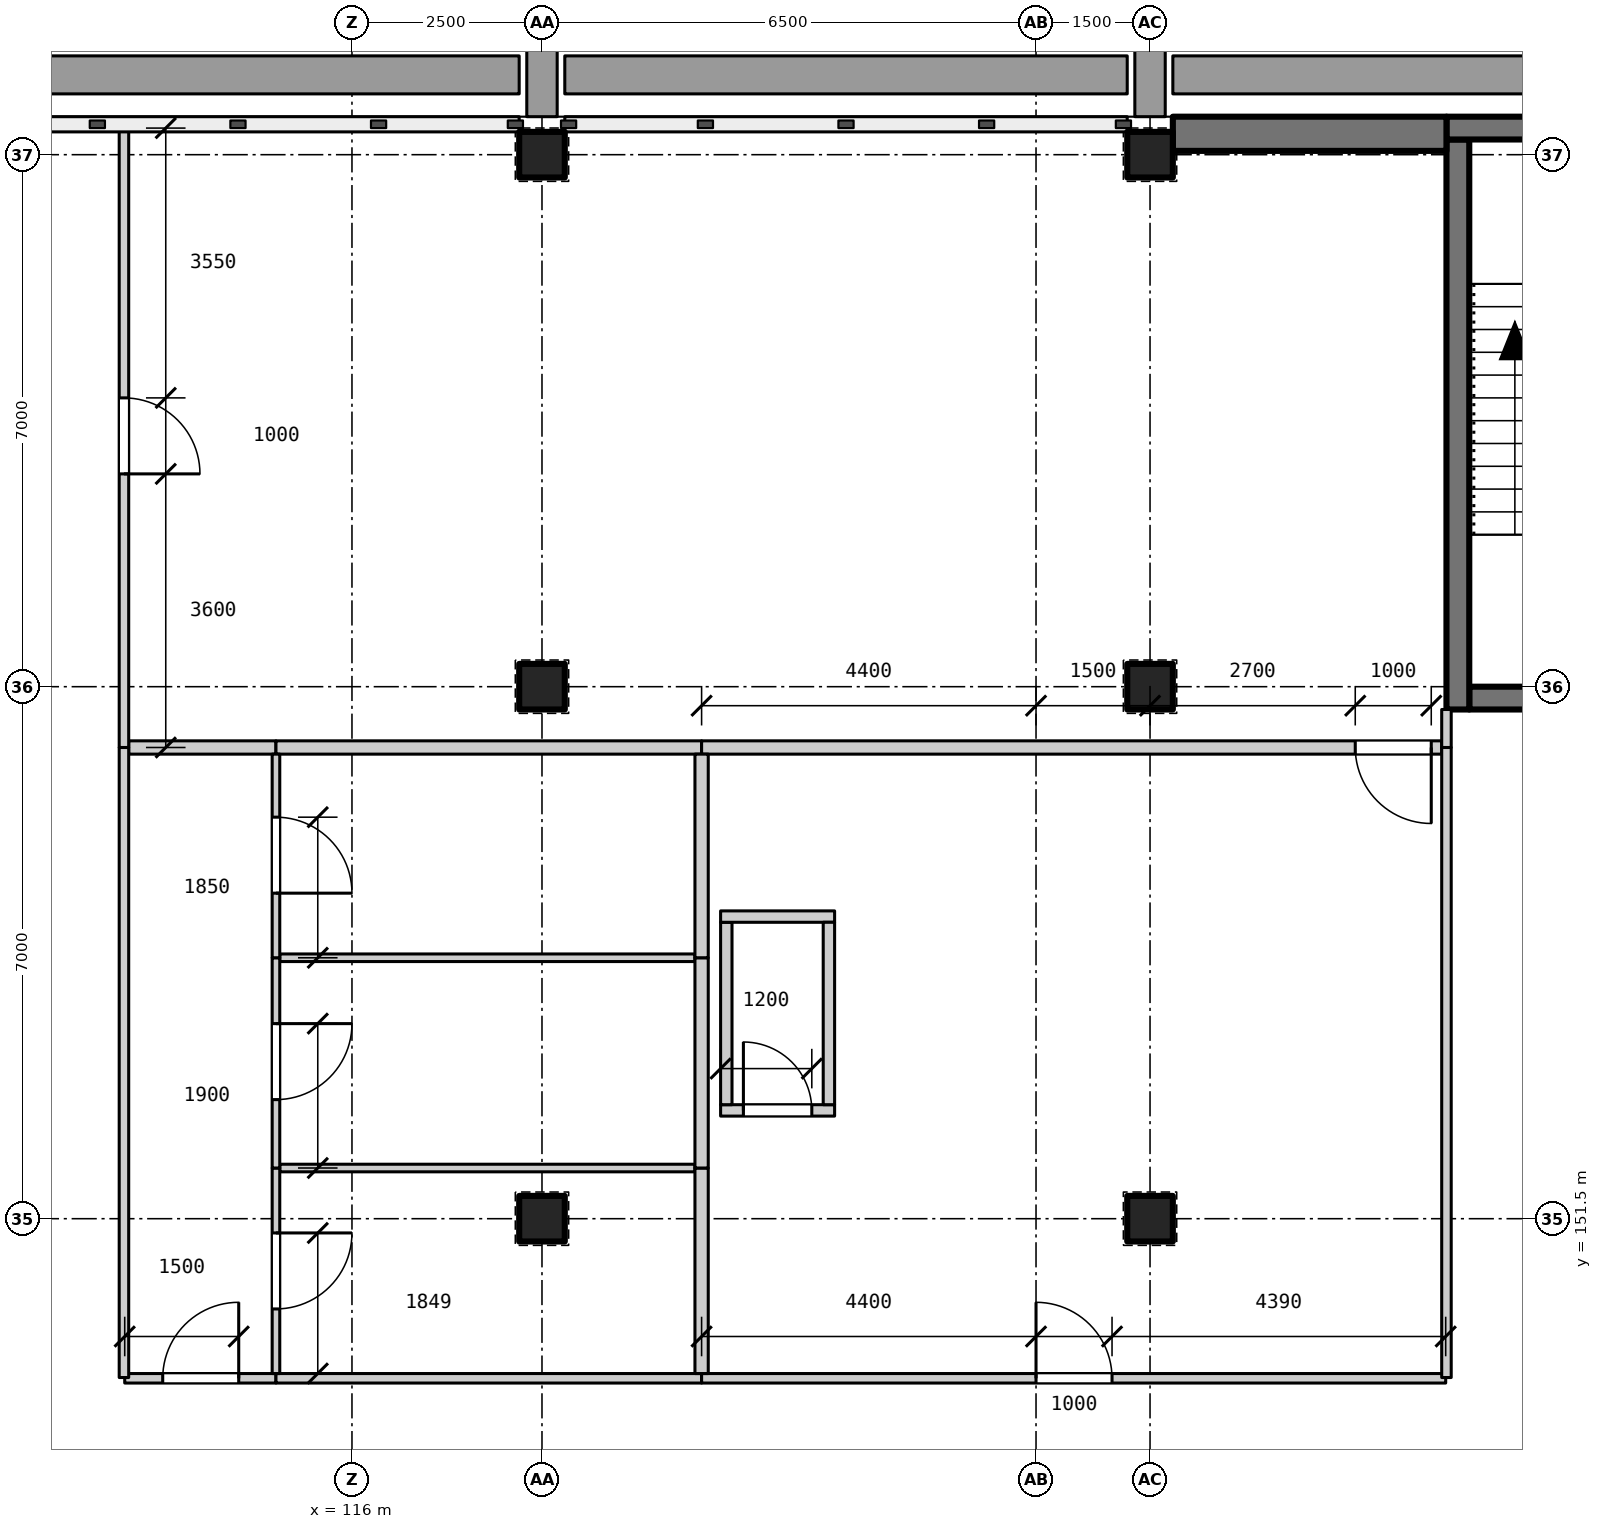
"""IFC4 building model, lengths in metres.
Left out: names, types, materials, properties, quantities, classifications, styles, units other than length and angle.
Written with IfcOpenShell. Run it as: python <this file> out.ifc"""

import sys

from ifc_helpers import new_model, si_unit, direction, frame, frame_2d, origin, origin_2d, place, context, subcontext, project, spatial, rectangle, extrude, element, fill, save


model = new_model("IFC4")
c1 = context("Model", 3, precision=1e-05, world=origin(), true_north=direction((0.0, 1.0)))
c2 = subcontext(c1, "Body", "Model", "MODEL_VIEW")
j1 = project(units=[si_unit("LENGTHUNIT", "METRE"), si_unit("PLANEANGLEUNIT", "RADIAN")], contexts=[c1])
p1 = place(None, origin())
s1 = spatial("IfcSite", under=j1, at=p1, CompositionType="ELEMENT")
p2 = place(p1, origin())
s2 = spatial("IfcBuilding", under=s1, at=p2, CompositionType="ELEMENT")
p3 = place(p2, frame((0.0, 0.0, 10.2)))
s3 = spatial("IfcBuildingStorey", under=s2, at=p3, CompositionType="ELEMENT", Elevation=10.2)
for number, where, z_axis, x_axis in (
    (1, (118.5, 151.5, 0.0), (0.0, 0.0, 1.0), (1.0, 0.0, 0.0)),
    (2, (118.5, 158.5, 0.0), (0.0, 0.0, 1.0), (1.0, 0.0, 0.0)),
    (3, (118.5, 165.5, 0.0), (0.0, 0.0, 1.0), (1.0, 0.0, 0.0)),
    (4, (126.5, 151.5, 0.0), (0.0, 0.0, 1.0), (1.0, 0.0, 0.0)),
    (5, (126.5, 158.5, 0.0), (0.0, 0.0, 1.0), (1.0, 0.0, 0.0)),
    (6, (126.5, 165.5, 0.0), (0.0, 0.0, 1.0), (1.0, 0.0, 0.0)),
):
    element("IfcColumn", number, at=place(p3, frame(where, z_axis=z_axis, x_axis=x_axis)), inside=s3, PredefinedType="COLUMN", context=c2, shape_type="SweptSolid", body=[
        extrude(rectangle(XDim=0.6, YDim=0.6, at=origin_2d()), origin(), (0.0, 0.0, 1.0), 4.2),
    ])
p4 = place(p3, frame((130.7, 158.35, 0.0), z_axis=(0.0, 0.0, 1.0), x_axis=(1.0, 0.0, 0.0)))
e7 = element("IfcWall", 7, at=p4, inside=s3, PredefinedType="SHEAR", context=c2, shape_type="SweptSolid", body=[
    extrude(rectangle(XDim=3.0, YDim=0.3, at=frame_2d((1.5, 0.0))), origin(), (0.0, 0.0, 1.0), 4.2),
])
p5 = place(p4, frame((0.95, 0.0, 0.0)))
e8 = element("IfcOpeningElement", 8, at=p5, cuts=e7, PredefinedType="OPENING", context=c2, shape_type="SweptSolid", body=[
    extrude(rectangle(XDim=1.1, YDim=2.1, at=frame_2d((0.55, 1.05))), frame((0.0, 0.16, 0.0), z_axis=(0.0, -1.0, 0.0), x_axis=(1.0, 0.0, 0.0)), (0.0, 0.0, 1.0), 0.32),
])
p6 = place(p3, frame((130.55, 158.2, 0.0), z_axis=(0.0, 0.0, 1.0), x_axis=(0.0, 1.0, 0.0)))
e9 = element("IfcWall", 9, at=p6, inside=s3, PredefinedType="SHEAR", context=c2, shape_type="SweptSolid", body=[
    extrude(rectangle(XDim=7.5, YDim=0.3, at=frame_2d((3.75, 0.0))), origin(), (0.0, 0.0, 1.0), 4.2),
])
p7 = place(p3, frame((130.4, 165.85, 0.0), z_axis=(0.0, 0.0, 1.0), x_axis=(1.0, 0.0, 0.0)))
e10 = element("IfcWall", 10, at=p7, inside=s3, PredefinedType="SOLIDWALL", context=c2, shape_type="SweptSolid", body=[
    extrude(rectangle(XDim=3.6, YDim=0.3, at=frame_2d((1.8, 0.0))), origin(), (0.0, 0.0, 1.0), 3.9),
])
p8 = place(p3, frame((126.8, 165.775, 0.0), z_axis=(0.0, 0.0, 1.0), x_axis=(1.0, 0.0, 0.0)))
e11 = element("IfcWall", 11, at=p8, inside=s3, PredefinedType="SOLIDWALL", context=c2, shape_type="SweptSolid", body=[
    extrude(rectangle(XDim=3.6, YDim=0.45, at=frame_2d((1.8, 0.0))), origin(), (0.0, 0.0, 1.0), 3.1),
])
p9 = place(p3, frame((120.85, 152.925, 0.0), z_axis=(0.0, 0.0, 1.0), x_axis=(1.0, 0.0, 0.0)))
e12 = element("IfcWall", 12, at=p9, inside=s3, PredefinedType="PARTITIONING", context=c2, shape_type="SweptSolid", body=[
    extrude(rectangle(XDim=1.5, YDim=0.15, at=frame_2d((0.75, 0.0))), origin(), (0.0, 0.0, 1.0), 3.9),
])
p10 = place(p9, frame((0.3, 0.0, 0.0)))
e13 = element("IfcOpeningElement", 13, at=p10, cuts=e12, PredefinedType="OPENING", context=c2, shape_type="SweptSolid", body=[
    extrude(rectangle(XDim=0.9, YDim=2.1, at=frame_2d((0.45, 1.05))), frame((0.0, 0.085, 0.0), z_axis=(0.0, -1.0, 0.0), x_axis=(1.0, 0.0, 0.0)), (0.0, 0.0, 1.0), 0.17),
])
p11 = place(p3, frame((120.925, 153.0, 0.0), z_axis=(0.0, 0.0, 1.0), x_axis=(0.0, 1.0, 0.0)))
e14 = element("IfcWall", 14, at=p11, inside=s3, PredefinedType="PARTITIONING", context=c2, shape_type="SweptSolid", body=[
    extrude(rectangle(XDim=2.4, YDim=0.15, at=frame_2d((1.2, 0.0))), origin(), (0.0, 0.0, 1.0), 3.9),
])
p12 = place(p3, frame((120.85, 155.475, 0.0), z_axis=(0.0, 0.0, 1.0), x_axis=(1.0, 0.0, 0.0)))
e15 = element("IfcWall", 15, at=p12, inside=s3, PredefinedType="PARTITIONING", context=c2, shape_type="SweptSolid", body=[
    extrude(rectangle(XDim=1.5, YDim=0.15, at=frame_2d((0.75, 0.0))), origin(), (0.0, 0.0, 1.0), 3.9),
])
p13 = place(p3, frame((122.275, 153.0, 0.0), z_axis=(0.0, 0.0, 1.0), x_axis=(0.0, 1.0, 0.0)))
e16 = element("IfcWall", 16, at=p13, inside=s3, PredefinedType="PARTITIONING", context=c2, shape_type="SweptSolid", body=[
    extrude(rectangle(XDim=2.4, YDim=0.15, at=frame_2d((1.2, 0.0))), origin(), (0.0, 0.0, 1.0), 3.9),
])
p14 = place(p3, frame((113.01, 149.4, 0.0), z_axis=(0.0, 0.0, 1.0), x_axis=(1.0, 0.0, 0.0)))
e17 = element("IfcWall", 17, at=p14, inside=s3, PredefinedType="PARTITIONING", context=c2, shape_type="SweptSolid", body=[
    extrude(rectangle(XDim=1.99, YDim=0.125, at=frame_2d((0.995, 0.0))), origin(), (0.0, 0.0, 1.0), 3.9),
])
p15 = place(p14, frame((0.5, 0.0, 0.0)))
e18 = element("IfcOpeningElement", 18, at=p15, cuts=e17, PredefinedType="OPENING", context=c2, shape_type="SweptSolid", body=[
    extrude(rectangle(XDim=1.0, YDim=2.1, at=frame_2d((0.5, 1.05))), frame((0.0, 0.073, 0.0), z_axis=(0.0, -1.0, 0.0), x_axis=(1.0, 0.0, 0.0)), (0.0, 0.0, 1.0), 0.145),
])
p16 = place(p3, frame((115.0, 149.4, 0.0), z_axis=(0.0, 0.0, 1.0), x_axis=(1.0, 0.0, 0.0)))
e19 = element("IfcWall", 19, at=p16, inside=s3, PredefinedType="PARTITIONING", context=c2, shape_type="SweptSolid", body=[
    extrude(rectangle(XDim=5.6, YDim=0.125, at=frame_2d((2.8, 0.0))), origin(), (0.0, 0.0, 1.0), 3.9),
])
p17 = place(p3, frame((120.6, 149.4, 0.0), z_axis=(0.0, 0.0, 1.0), x_axis=(1.0, 0.0, 0.0)))
e20 = element("IfcWall", 20, at=p17, inside=s3, PredefinedType="PARTITIONING", context=c2, shape_type="SweptSolid", body=[
    extrude(rectangle(XDim=9.79, YDim=0.125, at=frame_2d((4.895, 0.0))), origin(), (0.0, 0.0, 1.0), 3.9),
])
p18 = place(p17, frame((4.4, 0.0, 0.0)))
e21 = element("IfcOpeningElement", 21, at=p18, cuts=e20, PredefinedType="OPENING", context=c2, shape_type="SweptSolid", body=[
    extrude(rectangle(XDim=1.0, YDim=2.1, at=frame_2d((0.5, 1.05))), frame((0.0, 0.073, 0.0), z_axis=(0.0, -1.0, 0.0), x_axis=(1.0, 0.0, 0.0)), (0.0, 0.0, 1.0), 0.145),
])
for number, where, z_axis, x_axis in (
    (22, (115.05, 152.167, 0.0), (0.0, 0.0, 1.0), (1.0, 0.0, 0.0)),
    (23, (115.05, 154.933, 0.0), (0.0, 0.0, 1.0), (1.0, 0.0, 0.0)),
):
    element("IfcWall", number, at=place(p3, frame(where, z_axis=z_axis, x_axis=x_axis)), inside=s3, PredefinedType="PARTITIONING", context=c2, shape_type="SweptSolid", body=[
        extrude(rectangle(XDim=5.462, YDim=0.1, at=frame_2d((2.731, 0.0))), origin(), (0.0, 0.0, 1.0), 3.9),
    ])
p19 = place(p3, frame((113.062, 157.7, 0.0), z_axis=(0.0, 0.0, 1.0), x_axis=(1.0, 0.0, 0.0)))
e24 = element("IfcWall", 24, at=p19, inside=s3, PredefinedType="PARTITIONING", context=c2, shape_type="SweptSolid", body=[
    extrude(rectangle(XDim=1.938, YDim=0.175, at=frame_2d((0.969, 0.0))), origin(), (0.0, 0.0, 1.0), 3.9),
])
p20 = place(p3, frame((115.0, 157.7, 0.0), z_axis=(0.0, 0.0, 1.0), x_axis=(1.0, 0.0, 0.0)))
e25 = element("IfcWall", 25, at=p20, inside=s3, PredefinedType="PARTITIONING", context=c2, shape_type="SweptSolid", body=[
    extrude(rectangle(XDim=5.6, YDim=0.175, at=frame_2d((2.8, 0.0))), origin(), (0.0, 0.0, 1.0), 3.9),
])
p21 = place(p3, frame((120.6, 157.7, 0.0), z_axis=(0.0, 0.0, 1.0), x_axis=(1.0, 0.0, 0.0)))
e26 = element("IfcWall", 26, at=p21, inside=s3, PredefinedType="PARTITIONING", context=c2, shape_type="SweptSolid", body=[
    extrude(rectangle(XDim=9.737, YDim=0.175, at=frame_2d((4.869, 0.0))), origin(), (0.0, 0.0, 1.0), 3.9),
])
p22 = place(p21, frame((8.6, 0.0, 0.0)))
e27 = element("IfcOpeningElement", 27, at=p22, cuts=e26, PredefinedType="OPENING", context=c2, shape_type="SweptSolid", body=[
    extrude(rectangle(XDim=1.0, YDim=2.1, at=frame_2d((0.5, 1.05))), frame((0.0, 0.097, 0.0), z_axis=(0.0, -1.0, 0.0), x_axis=(1.0, 0.0, 0.0)), (0.0, 0.0, 1.0), 0.195),
])
p23 = place(p3, frame((113.0, 149.41, 0.0), z_axis=(0.0, 0.0, 1.0), x_axis=(0.0, 1.0, 0.0)))
e28 = element("IfcWall", 28, at=p23, inside=s3, PredefinedType="PARTITIONING", context=c2, shape_type="SweptSolid", body=[
    extrude(rectangle(XDim=8.29, YDim=0.125, at=frame_2d((4.145, 0.0))), origin(), (0.0, 0.0, 1.0), 3.9),
])
p24 = place(p3, frame((113.0, 157.7, 0.0), z_axis=(0.0, 0.0, 1.0), x_axis=(0.0, 1.0, 0.0)))
e29 = element("IfcWall", 29, at=p24, inside=s3, PredefinedType="PARTITIONING", context=c2, shape_type="SweptSolid", body=[
    extrude(rectangle(XDim=8.15, YDim=0.125, at=frame_2d((4.075, 0.0))), origin(), (0.0, 0.0, 1.0), 3.9),
])
p25 = place(p24, frame((3.6, 0.0, 0.0)))
e30 = element("IfcOpeningElement", 30, at=p25, cuts=e29, PredefinedType="OPENING", context=c2, shape_type="SweptSolid", body=[
    extrude(rectangle(XDim=1.0, YDim=2.1, at=frame_2d((0.5, 1.05))), frame((0.0, 0.073, 0.0), z_axis=(0.0, -1.0, 0.0), x_axis=(1.0, 0.0, 0.0)), (0.0, 0.0, 1.0), 0.145),
])
p26 = place(p3, frame((115.0, 149.462, 0.0), z_axis=(0.0, 0.0, 1.0), x_axis=(0.0, 1.0, 0.0)))
e31 = element("IfcWall", 31, at=p26, inside=s3, PredefinedType="PARTITIONING", context=c2, shape_type="SweptSolid", body=[
    extrude(rectangle(XDim=2.704, YDim=0.1, at=frame_2d((1.352, 0.0))), origin(), (0.0, 0.0, 1.0), 3.9),
])
p27 = place(p26, frame((0.85, 0.0, 0.0)))
e32 = element("IfcOpeningElement", 32, at=p27, cuts=e31, PredefinedType="OPENING", context=c2, shape_type="SweptSolid", body=[
    extrude(rectangle(XDim=1.0, YDim=2.1, at=frame_2d((0.5, 1.05))), frame((0.0, 0.06, 0.0), z_axis=(0.0, -1.0, 0.0), x_axis=(1.0, 0.0, 0.0)), (0.0, 0.0, 1.0), 0.12),
])
p28 = place(p3, frame((115.0, 152.167, 0.0), z_axis=(0.0, 0.0, 1.0), x_axis=(0.0, 1.0, 0.0)))
e33 = element("IfcWall", 33, at=p28, inside=s3, PredefinedType="PARTITIONING", context=c2, shape_type="SweptSolid", body=[
    extrude(rectangle(XDim=2.767, YDim=0.1, at=frame_2d((1.383, 0.0))), origin(), (0.0, 0.0, 1.0), 3.9),
])
p29 = place(p28, frame((0.9, 0.0, 0.0)))
e34 = element("IfcOpeningElement", 34, at=p29, cuts=e33, PredefinedType="OPENING", context=c2, shape_type="SweptSolid", body=[
    extrude(rectangle(XDim=1.0, YDim=2.1, at=frame_2d((0.5, 1.05))), frame((0.0, 0.06, 0.0), z_axis=(0.0, -1.0, 0.0), x_axis=(1.0, 0.0, 0.0)), (0.0, 0.0, 1.0), 0.12),
])
p30 = place(p3, frame((115.0, 154.933, 0.0), z_axis=(0.0, 0.0, 1.0), x_axis=(0.0, 1.0, 0.0)))
e35 = element("IfcWall", 35, at=p30, inside=s3, PredefinedType="PARTITIONING", context=c2, shape_type="SweptSolid", body=[
    extrude(rectangle(XDim=2.679, YDim=0.1, at=frame_2d((1.34, 0.0))), origin(), (0.0, 0.0, 1.0), 3.9),
])
p31 = place(p30, frame((0.85, 0.0, 0.0)))
e36 = element("IfcOpeningElement", 36, at=p31, cuts=e35, PredefinedType="OPENING", context=c2, shape_type="SweptSolid", body=[
    extrude(rectangle(XDim=1.0, YDim=2.1, at=frame_2d((0.5, 1.05))), frame((0.0, 0.06, 0.0), z_axis=(0.0, -1.0, 0.0), x_axis=(1.0, 0.0, 0.0)), (0.0, 0.0, 1.0), 0.12),
])
p32 = place(p3, frame((120.6, 149.462, 0.0), z_axis=(0.0, 0.0, 1.0), x_axis=(0.0, 1.0, 0.0)))
e37 = element("IfcWall", 37, at=p32, inside=s3, PredefinedType="PARTITIONING", context=c2, shape_type="SweptSolid", body=[
    extrude(rectangle(XDim=2.704, YDim=0.175, at=frame_2d((1.352, 0.0))), origin(), (0.0, 0.0, 1.0), 3.9),
])
p33 = place(p3, frame((120.6, 152.167, 0.0), z_axis=(0.0, 0.0, 1.0), x_axis=(0.0, 1.0, 0.0)))
e38 = element("IfcWall", 38, at=p33, inside=s3, PredefinedType="PARTITIONING", context=c2, shape_type="SweptSolid", body=[
    extrude(rectangle(XDim=2.767, YDim=0.175, at=frame_2d((1.383, 0.0))), origin(), (0.0, 0.0, 1.0), 3.9),
])
p34 = place(p3, frame((120.6, 154.933, 0.0), z_axis=(0.0, 0.0, 1.0), x_axis=(0.0, 1.0, 0.0)))
e39 = element("IfcWall", 39, at=p34, inside=s3, PredefinedType="PARTITIONING", context=c2, shape_type="SweptSolid", body=[
    extrude(rectangle(XDim=2.679, YDim=0.175, at=frame_2d((1.34, 0.0))), origin(), (0.0, 0.0, 1.0), 3.9),
])
p35 = place(p3, frame((130.4, 149.41, 0.0), z_axis=(0.0, 0.0, 1.0), x_axis=(0.0, 1.0, 0.0)))
e40 = element("IfcWall", 40, at=p35, inside=s3, PredefinedType="PARTITIONING", context=c2, shape_type="SweptSolid", body=[
    extrude(rectangle(XDim=8.29, YDim=0.125, at=frame_2d((4.145, 0.0))), origin(), (0.0, 0.0, 1.0), 3.9),
])
p36 = place(p3, frame((130.4, 157.7, 0.0), z_axis=(0.0, 0.0, 1.0), x_axis=(0.0, 1.0, 0.0)))
e41 = element("IfcWall", 41, at=p36, inside=s3, PredefinedType="PARTITIONING", context=c2, shape_type="SweptSolid", body=[
    extrude(rectangle(XDim=0.5, YDim=0.125, at=frame_2d((0.25, 0.0))), origin(), (0.0, 0.0, 1.0), 3.9),
])
p37 = place(p15, origin())
e42 = element("IfcDoor", 42, at=p37, inside=s3, OperationType="SINGLE_SWING_RIGHT", PredefinedType="DOOR", context=c2, shape_type="SweptSolid", body=[
    extrude(rectangle(XDim=1.0, YDim=2.1, at=frame_2d((0.5, 1.05))), frame((0.0, 0.025, 0.0), z_axis=(0.0, -1.0, 0.0), x_axis=(1.0, 0.0, 0.0)), (0.0, 0.0, 1.0), 0.05),
])
fill(e18, e42)
p38 = place(p18, origin())
e43 = element("IfcDoor", 43, at=p38, inside=s3, OperationType="SINGLE_SWING_LEFT", PredefinedType="DOOR", context=c2, shape_type="SweptSolid", body=[
    extrude(rectangle(XDim=1.0, YDim=2.1, at=frame_2d((0.5, 1.05))), frame((0.0, 0.025, 0.0), z_axis=(0.0, -1.0, 0.0), x_axis=(1.0, 0.0, 0.0)), (0.0, 0.0, 1.0), 0.05),
])
fill(e21, e43)
p39 = place(p27, frame((1.0, 0.0, 0.0), z_axis=(0.0, 0.0, 1.0), x_axis=(-1.0, 0.0, 0.0)))
e44 = element("IfcDoor", 44, at=p39, inside=s3, OperationType="SINGLE_SWING_LEFT", PredefinedType="DOOR", context=c2, shape_type="SweptSolid", body=[
    extrude(rectangle(XDim=1.0, YDim=2.1, at=frame_2d((0.5, 1.05))), frame((0.0, 0.025, 0.0), z_axis=(0.0, -1.0, 0.0), x_axis=(1.0, 0.0, 0.0)), (0.0, 0.0, 1.0), 0.05),
])
fill(e32, e44)
p40 = place(p10, origin())
e45 = element("IfcDoor", 45, at=p40, inside=s3, OperationType="SINGLE_SWING_LEFT", PredefinedType="DOOR", context=c2, shape_type="SweptSolid", body=[
    extrude(rectangle(XDim=0.9, YDim=2.1, at=frame_2d((0.45, 1.05))), frame((0.0, 0.025, 0.0), z_axis=(0.0, -1.0, 0.0), x_axis=(1.0, 0.0, 0.0)), (0.0, 0.0, 1.0), 0.05),
])
fill(e13, e45)
p41 = place(p29, frame((1.0, 0.0, 0.0), z_axis=(0.0, 0.0, 1.0), x_axis=(-1.0, 0.0, 0.0)))
e46 = element("IfcDoor", 46, at=p41, inside=s3, OperationType="SINGLE_SWING_LEFT", PredefinedType="DOOR", context=c2, shape_type="SweptSolid", body=[
    extrude(rectangle(XDim=1.0, YDim=2.1, at=frame_2d((0.5, 1.05))), frame((0.0, 0.025, 0.0), z_axis=(0.0, -1.0, 0.0), x_axis=(1.0, 0.0, 0.0)), (0.0, 0.0, 1.0), 0.05),
])
fill(e34, e46)
p42 = place(p31, frame((1.0, 0.0, 0.0), z_axis=(0.0, 0.0, 1.0), x_axis=(-1.0, 0.0, 0.0)))
e47 = element("IfcDoor", 47, at=p42, inside=s3, OperationType="SINGLE_SWING_RIGHT", PredefinedType="DOOR", context=c2, shape_type="SweptSolid", body=[
    extrude(rectangle(XDim=1.0, YDim=2.1, at=frame_2d((0.5, 1.05))), frame((0.0, 0.025, 0.0), z_axis=(0.0, -1.0, 0.0), x_axis=(1.0, 0.0, 0.0)), (0.0, 0.0, 1.0), 0.05),
])
fill(e36, e47)
p43 = place(p22, frame((1.0, 0.0, 0.0), z_axis=(0.0, 0.0, 1.0), x_axis=(-1.0, 0.0, 0.0)))
e48 = element("IfcDoor", 48, at=p43, inside=s3, OperationType="SINGLE_SWING_LEFT", PredefinedType="DOOR", context=c2, shape_type="SweptSolid", body=[
    extrude(rectangle(XDim=1.0, YDim=2.1, at=frame_2d((0.5, 1.05))), frame((0.0, 0.025, 0.0), z_axis=(0.0, -1.0, 0.0), x_axis=(1.0, 0.0, 0.0)), (0.0, 0.0, 1.0), 0.05),
])
fill(e27, e48)
p44 = place(p25, frame((1.0, 0.0, 0.0), z_axis=(0.0, 0.0, 1.0), x_axis=(-1.0, 0.0, 0.0)))
e49 = element("IfcDoor", 49, at=p44, inside=s3, OperationType="SINGLE_SWING_RIGHT", PredefinedType="DOOR", context=c2, shape_type="SweptSolid", body=[
    extrude(rectangle(XDim=1.0, YDim=2.1, at=frame_2d((0.5, 1.05))), frame((0.0, 0.025, 0.0), z_axis=(0.0, -1.0, 0.0), x_axis=(1.0, 0.0, 0.0)), (0.0, 0.0, 1.0), 0.05),
])
fill(e30, e49)
save(model, sys.argv[1])
